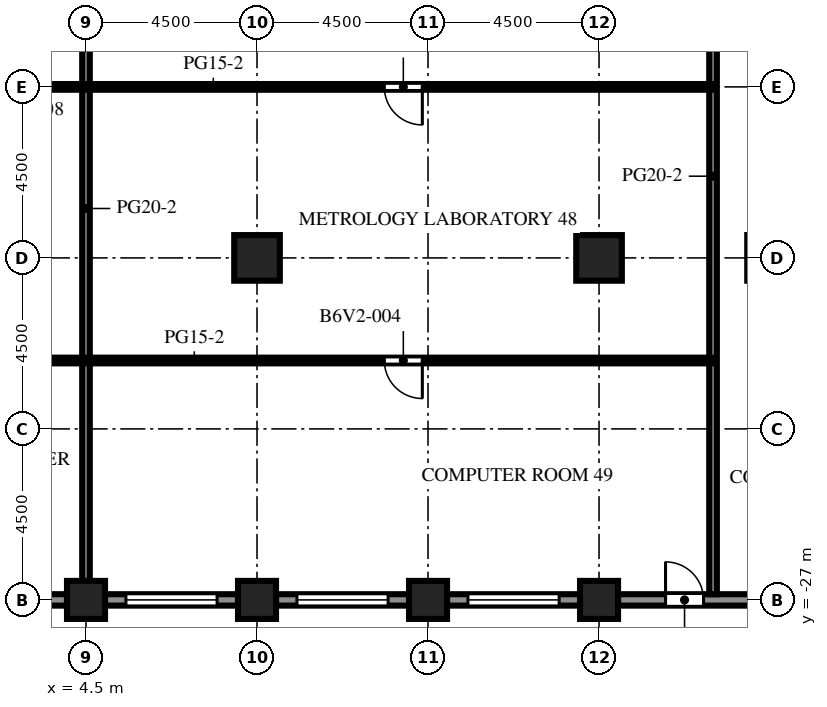
"""IFC4 building model, lengths in metres.
Left out: names, types, materials, properties, quantities, classifications, styles, units other than length and angle.
Written with IfcOpenShell. Run it as: python <this file> out.ifc"""

import sys

from ifc_helpers import new_model, si_unit, direction, frame, frame_2d, origin, origin_2d, place, context, subcontext, project, spatial, rectangle, extrude, element, fill, save


model = new_model("IFC4")
c1 = context("Model", 3, precision=1e-05, world=origin(), true_north=direction((0.0, 1.0)))
c2 = subcontext(c1, "Body", "Model", "MODEL_VIEW")
j1 = project(units=[si_unit("LENGTHUNIT", "METRE"), si_unit("PLANEANGLEUNIT", "RADIAN")], contexts=[c1])
p1 = place(None, origin())
s1 = spatial("IfcSite", under=j1, at=p1, CompositionType="ELEMENT")
p2 = place(p1, origin())
s2 = spatial("IfcBuilding", under=s1, at=p2, CompositionType="ELEMENT")
p3 = place(p2, frame((0.0, 0.0, 216.1)))
s3 = spatial("IfcBuildingStorey", under=s2, at=p3, CompositionType="ELEMENT", Elevation=216.1)
for number, where, z_axis, x_axis in (
    (1, (4.5, -27.0, 0.0), (0.0, 0.0, 1.0), (1.0, 0.0, 0.0)),
    (2, (9.0, -27.0, 0.0), (0.0, 0.0, 1.0), (1.0, 0.0, 0.0)),
    (3, (13.5, -27.0, 0.0), (0.0, 0.0, 1.0), (1.0, 0.0, 0.0)),
    (4, (18.0, -27.0, 0.0), (0.0, 0.0, 1.0), (1.0, 0.0, 0.0)),
):
    element("IfcColumn", number, at=place(p3, frame(where, z_axis=z_axis, x_axis=x_axis)), inside=s3, PredefinedType="COLUMN", context=c2, shape_type="SweptSolid", body=[
        extrude(rectangle(XDim=1.0, YDim=1.0, at=origin_2d()), origin(), (0.0, 0.0, 1.0), 4.1),
    ])
for number, where, z_axis, x_axis in (
    (5, (9.0, -18.0, 0.0), (0.0, 0.0, 1.0), (1.0, 0.0, 0.0)),
    (6, (18.0, -18.0, 0.0), (0.0, 0.0, 1.0), (1.0, 0.0, 0.0)),
):
    element("IfcColumn", number, at=place(p3, frame(where, z_axis=z_axis, x_axis=x_axis)), inside=s3, PredefinedType="COLUMN", context=c2, shape_type="SweptSolid", body=[
        extrude(rectangle(XDim=1.2, YDim=1.2, at=origin_2d()), origin(), (0.0, 0.0, 1.0), 4.1),
    ])
p4 = place(p3, frame((4.0, -27.0, 0.0), z_axis=(0.0, 0.0, 1.0), x_axis=(-1.0, 0.0, 0.0)))
e7 = element("IfcWall", 7, at=p4, inside=s3, PredefinedType="SOLIDWALL", context=c2, shape_type="SweptSolid", body=[
    extrude(rectangle(XDim=3.5, YDim=0.3, at=frame_2d((1.75, 0.0))), origin(), (0.0, 0.0, 1.0), 2.7),
])
p5 = place(p4, frame((0.55, 0.0, 0.8)))
e8 = element("IfcOpeningElement", 8, at=p5, cuts=e7, PredefinedType="OPENING", context=c2, shape_type="SweptSolid", body=[
    extrude(rectangle(XDim=2.4, YDim=1.7, at=frame_2d((1.2, 0.85))), frame((0.0, 0.16, 0.0), z_axis=(0.0, -1.0, 0.0), x_axis=(1.0, 0.0, 0.0)), (0.0, 0.0, 1.0), 0.32),
])
p6 = place(p3, frame((8.5, -27.0, 0.0), z_axis=(0.0, 0.0, 1.0), x_axis=(-1.0, 0.0, 0.0)))
e9 = element("IfcWall", 9, at=p6, inside=s3, PredefinedType="SOLIDWALL", context=c2, shape_type="SweptSolid", body=[
    extrude(rectangle(XDim=3.5, YDim=0.3, at=frame_2d((1.75, 0.0))), origin(), (0.0, 0.0, 1.0), 2.7),
])
p7 = place(p6, frame((0.55, 0.0, 0.8)))
e10 = element("IfcOpeningElement", 10, at=p7, cuts=e9, PredefinedType="OPENING", context=c2, shape_type="SweptSolid", body=[
    extrude(rectangle(XDim=2.4, YDim=1.7, at=frame_2d((1.2, 0.85))), frame((0.0, 0.16, 0.0), z_axis=(0.0, -1.0, 0.0), x_axis=(1.0, 0.0, 0.0)), (0.0, 0.0, 1.0), 0.32),
])
p8 = place(p3, frame((13.0, -27.0, 0.0), z_axis=(0.0, 0.0, 1.0), x_axis=(-1.0, 0.0, 0.0)))
e11 = element("IfcWall", 11, at=p8, inside=s3, PredefinedType="SOLIDWALL", context=c2, shape_type="SweptSolid", body=[
    extrude(rectangle(XDim=3.5, YDim=0.3, at=frame_2d((1.75, 0.0))), origin(), (0.0, 0.0, 1.0), 2.7),
])
p9 = place(p8, frame((0.55, 0.0, 0.8)))
e12 = element("IfcOpeningElement", 12, at=p9, cuts=e11, PredefinedType="OPENING", context=c2, shape_type="SweptSolid", body=[
    extrude(rectangle(XDim=2.4, YDim=1.7, at=frame_2d((1.2, 0.85))), frame((0.0, 0.16, 0.0), z_axis=(0.0, -1.0, 0.0), x_axis=(1.0, 0.0, 0.0)), (0.0, 0.0, 1.0), 0.32),
])
p10 = place(p3, frame((17.5, -27.0, 0.0), z_axis=(0.0, 0.0, 1.0), x_axis=(-1.0, 0.0, 0.0)))
e13 = element("IfcWall", 13, at=p10, inside=s3, PredefinedType="SOLIDWALL", context=c2, shape_type="SweptSolid", body=[
    extrude(rectangle(XDim=3.5, YDim=0.3, at=frame_2d((1.75, 0.0))), origin(), (0.0, 0.0, 1.0), 2.7),
])
p11 = place(p10, frame((0.55, 0.0, 0.8)))
e14 = element("IfcOpeningElement", 14, at=p11, cuts=e13, PredefinedType="OPENING", context=c2, shape_type="SweptSolid", body=[
    extrude(rectangle(XDim=2.4, YDim=1.7, at=frame_2d((1.2, 0.85))), frame((0.0, 0.16, 0.0), z_axis=(0.0, -1.0, 0.0), x_axis=(1.0, 0.0, 0.0)), (0.0, 0.0, 1.0), 0.32),
])
p12 = place(p3, frame((22.0, -27.0, 0.0), z_axis=(0.0, 0.0, 1.0), x_axis=(-1.0, 0.0, 0.0)))
e15 = element("IfcWall", 15, at=p12, inside=s3, PredefinedType="SOLIDWALL", context=c2, shape_type="SweptSolid", body=[
    extrude(rectangle(XDim=3.5, YDim=0.3, at=frame_2d((1.75, 0.0))), origin(), (0.0, 0.0, 1.0), 2.7),
])
p13 = place(p12, frame((1.25, 0.0, 0.0)))
e16 = element("IfcOpeningElement", 16, at=p13, cuts=e15, PredefinedType="OPENING", context=c2, shape_type="SweptSolid", body=[
    extrude(rectangle(XDim=1.0, YDim=2.2, at=frame_2d((0.5, 1.1))), frame((0.0, 0.16, 0.0), z_axis=(0.0, -1.0, 0.0), x_axis=(1.0, 0.0, 0.0)), (0.0, 0.0, 1.0), 0.32),
])
p14 = place(p3, frame((4.5, -4.5, 0.0), z_axis=(0.0, 0.0, 1.0), x_axis=(0.0, -1.0, 0.0)))
e17 = element("IfcWall", 17, at=p14, inside=s3, PredefinedType="PARTITIONING", context=c2, shape_type="SweptSolid", body=[
    extrude(rectangle(XDim=22.0, YDim=0.2, at=frame_2d((11.0, 0.0))), origin(), (0.0, 0.0, 1.0), 3.5),
])
p15 = place(p14, frame((1.4, 0.0, 0.0)))
e18 = element("IfcOpeningElement", 18, at=p15, cuts=e17, PredefinedType="OPENING", context=c2, shape_type="SweptSolid", body=[
    extrude(rectangle(XDim=1.0, YDim=2.1, at=frame_2d((0.5, 1.05))), frame((0.0, 0.11, 0.0), z_axis=(0.0, -1.0, 0.0), x_axis=(1.0, 0.0, 0.0)), (0.0, 0.0, 1.0), 0.22),
])
p16 = place(p3, frame((21.0, 3.25, 0.0), z_axis=(0.0, 0.0, 1.0), x_axis=(0.0, -1.0, 0.0)))
e19 = element("IfcWall", 19, at=p16, inside=s3, PredefinedType="PARTITIONING", context=c2, shape_type="SweptSolid", body=[
    extrude(rectangle(XDim=30.1, YDim=0.2, at=frame_2d((15.05, 0.0))), origin(), (0.0, 0.0, 1.0), 3.5),
])
p17 = place(p16, frame((7.1, 0.0, 0.0)))
e20 = element("IfcOpeningElement", 20, at=p17, cuts=e19, PredefinedType="OPENING", context=c2, shape_type="SweptSolid", body=[
    extrude(rectangle(XDim=1.0, YDim=2.1, at=frame_2d((0.5, 1.05))), frame((0.0, 0.11, 0.0), z_axis=(0.0, -1.0, 0.0), x_axis=(1.0, 0.0, 0.0)), (0.0, 0.0, 1.0), 0.22),
])
p18 = place(p3, frame((21.0, -20.7, 0.0), z_axis=(0.0, 0.0, 1.0), x_axis=(-1.0, 0.0, 0.0)))
e21 = element("IfcWall", 21, at=p18, inside=s3, PredefinedType="PARTITIONING", context=c2, shape_type="SweptSolid", body=[
    extrude(rectangle(XDim=34.5, YDim=0.15, at=frame_2d((17.25, 0.0))), origin(), (0.0, 0.0, 1.0), 3.5),
])
p19 = place(p18, frame((31.15, 0.0, 0.0)))
e22 = element("IfcOpeningElement", 22, at=p19, cuts=e21, PredefinedType="OPENING", context=c2, shape_type="SweptSolid", body=[
    extrude(rectangle(XDim=1.0, YDim=2.1, at=frame_2d((0.5, 1.05))), frame((0.0, 0.085, 0.0), z_axis=(0.0, -1.0, 0.0), x_axis=(1.0, 0.0, 0.0)), (0.0, 0.0, 1.0), 0.17),
])
p20 = place(p18, frame((25.65, 0.0, 0.0)))
e23 = element("IfcOpeningElement", 23, at=p20, cuts=e21, PredefinedType="OPENING", context=c2, shape_type="SweptSolid", body=[
    extrude(rectangle(XDim=1.0, YDim=2.1, at=frame_2d((0.5, 1.05))), frame((0.0, 0.085, 0.0), z_axis=(0.0, -1.0, 0.0), x_axis=(1.0, 0.0, 0.0)), (0.0, 0.0, 1.0), 0.17),
])
p21 = place(p18, frame((18.65, 0.0, 0.0)))
e24 = element("IfcOpeningElement", 24, at=p21, cuts=e21, PredefinedType="OPENING", context=c2, shape_type="SweptSolid", body=[
    extrude(rectangle(XDim=1.0, YDim=2.1, at=frame_2d((0.5, 1.05))), frame((0.0, 0.085, 0.0), z_axis=(0.0, -1.0, 0.0), x_axis=(1.0, 0.0, 0.0)), (0.0, 0.0, 1.0), 0.17),
])
p22 = place(p18, frame((7.65, 0.0, 0.0)))
e25 = element("IfcOpeningElement", 25, at=p22, cuts=e21, PredefinedType="OPENING", context=c2, shape_type="SweptSolid", body=[
    extrude(rectangle(XDim=1.0, YDim=2.1, at=frame_2d((0.5, 1.05))), frame((0.0, 0.085, 0.0), z_axis=(0.0, -1.0, 0.0), x_axis=(1.0, 0.0, 0.0)), (0.0, 0.0, 1.0), 0.17),
])
p23 = place(p3, frame((21.0, -13.5, 0.0), z_axis=(0.0, 0.0, 1.0), x_axis=(-1.0, 0.0, 0.0)))
e26 = element("IfcWall", 26, at=p23, inside=s3, PredefinedType="PARTITIONING", context=c2, shape_type="SweptSolid", body=[
    extrude(rectangle(XDim=34.5, YDim=0.15, at=frame_2d((17.25, 0.0))), origin(), (0.0, 0.0, 1.0), 3.5),
])
p24 = place(p23, frame((31.4, 0.0, 0.0)))
e27 = element("IfcOpeningElement", 27, at=p24, cuts=e26, PredefinedType="OPENING", context=c2, shape_type="SweptSolid", body=[
    extrude(rectangle(XDim=1.0, YDim=2.1, at=frame_2d((0.5, 1.05))), frame((0.0, 0.085, 0.0), z_axis=(0.0, -1.0, 0.0), x_axis=(1.0, 0.0, 0.0)), (0.0, 0.0, 1.0), 0.17),
])
p25 = place(p23, frame((24.15, 0.0, 0.0)))
e28 = element("IfcOpeningElement", 28, at=p25, cuts=e26, PredefinedType="OPENING", context=c2, shape_type="SweptSolid", body=[
    extrude(rectangle(XDim=1.0, YDim=2.1, at=frame_2d((0.5, 1.05))), frame((0.0, 0.085, 0.0), z_axis=(0.0, -1.0, 0.0), x_axis=(1.0, 0.0, 0.0)), (0.0, 0.0, 1.0), 0.17),
])
p26 = place(p23, frame((17.65, 0.0, 0.0)))
e29 = element("IfcOpeningElement", 29, at=p26, cuts=e26, PredefinedType="OPENING", context=c2, shape_type="SweptSolid", body=[
    extrude(rectangle(XDim=1.0, YDim=2.1, at=frame_2d((0.5, 1.05))), frame((0.0, 0.085, 0.0), z_axis=(0.0, -1.0, 0.0), x_axis=(1.0, 0.0, 0.0)), (0.0, 0.0, 1.0), 0.17),
])
p27 = place(p23, frame((7.65, 0.0, 0.0)))
e30 = element("IfcOpeningElement", 30, at=p27, cuts=e26, PredefinedType="OPENING", context=c2, shape_type="SweptSolid", body=[
    extrude(rectangle(XDim=1.0, YDim=2.1, at=frame_2d((0.5, 1.05))), frame((0.0, 0.085, 0.0), z_axis=(0.0, -1.0, 0.0), x_axis=(1.0, 0.0, 0.0)), (0.0, 0.0, 1.0), 0.17),
])
p28 = place(p7, origin())
e31 = element("IfcWindow", 31, at=p28, inside=s3, PartitioningType="SINGLE_PANEL", PredefinedType="WINDOW", context=c2, shape_type="SweptSolid", body=[
    extrude(rectangle(XDim=2.4, YDim=1.7, at=frame_2d((1.2, 0.85))), frame((0.0, 0.03, 0.0), z_axis=(0.0, -1.0, 0.0), x_axis=(1.0, 0.0, 0.0)), (0.0, 0.0, 1.0), 0.06),
])
fill(e10, e31)
p29 = place(p9, origin())
e32 = element("IfcWindow", 32, at=p29, inside=s3, PartitioningType="SINGLE_PANEL", PredefinedType="WINDOW", context=c2, shape_type="SweptSolid", body=[
    extrude(rectangle(XDim=2.4, YDim=1.7, at=frame_2d((1.2, 0.85))), frame((0.0, 0.03, 0.0), z_axis=(0.0, -1.0, 0.0), x_axis=(1.0, 0.0, 0.0)), (0.0, 0.0, 1.0), 0.06),
])
fill(e12, e32)
p30 = place(p11, origin())
e33 = element("IfcWindow", 33, at=p30, inside=s3, PartitioningType="SINGLE_PANEL", PredefinedType="WINDOW", context=c2, shape_type="SweptSolid", body=[
    extrude(rectangle(XDim=2.4, YDim=1.7, at=frame_2d((1.2, 0.85))), frame((0.0, 0.03, 0.0), z_axis=(0.0, -1.0, 0.0), x_axis=(1.0, 0.0, 0.0)), (0.0, 0.0, 1.0), 0.06),
])
fill(e14, e33)
p31 = place(p13, origin())
e34 = element("IfcDoor", 34, at=p31, inside=s3, OperationType="SINGLE_SWING_RIGHT", PredefinedType="DOOR", context=c2, shape_type="SweptSolid", body=[
    extrude(rectangle(XDim=1.0, YDim=2.2, at=frame_2d((0.5, 1.1))), frame((0.0, 0.025, 0.0), z_axis=(0.0, -1.0, 0.0), x_axis=(1.0, 0.0, 0.0)), (0.0, 0.0, 1.0), 0.05),
])
fill(e16, e34)
p32 = place(p22, origin())
e35 = element("IfcDoor", 35, at=p32, inside=s3, OperationType="SINGLE_SWING_LEFT", PredefinedType="DOOR", context=c2, shape_type="SweptSolid", body=[
    extrude(rectangle(XDim=1.0, YDim=2.1, at=frame_2d((0.5, 1.05))), frame((0.0, 0.025, 0.0), z_axis=(0.0, -1.0, 0.0), x_axis=(1.0, 0.0, 0.0)), (0.0, 0.0, 1.0), 0.05),
])
fill(e25, e35)
p33 = place(p27, origin())
e36 = element("IfcDoor", 36, at=p33, inside=s3, OperationType="SINGLE_SWING_LEFT", PredefinedType="DOOR", context=c2, shape_type="SweptSolid", body=[
    extrude(rectangle(XDim=1.0, YDim=2.1, at=frame_2d((0.5, 1.05))), frame((0.0, 0.025, 0.0), z_axis=(0.0, -1.0, 0.0), x_axis=(1.0, 0.0, 0.0)), (0.0, 0.0, 1.0), 0.05),
])
fill(e30, e36)
save(model, sys.argv[1])
